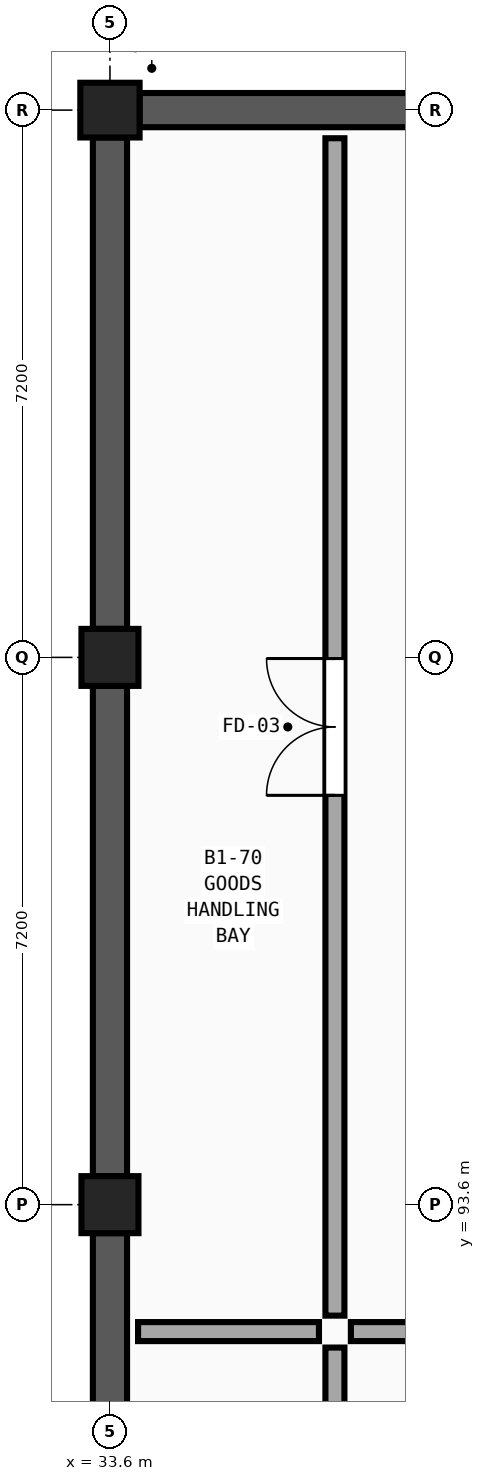
"""IFC4 building model, lengths in metres.
Left out: names, types, materials, properties, quantities, classifications, styles, units other than length and angle.
Written with IfcOpenShell. Run it as: python <this file> out.ifc"""

import sys

from ifc_helpers import new_model, si_unit, direction, frame, frame_2d, origin, origin_2d, place, context, subcontext, project, spatial, rectangle, extrude, element, fill, save


model = new_model("IFC4")
c1 = context("Model", 3, precision=1e-05, world=origin(), true_north=direction((0.0, 1.0)))
c2 = subcontext(c1, "Body", "Model", "MODEL_VIEW")
j1 = project(units=[si_unit("LENGTHUNIT", "METRE"), si_unit("PLANEANGLEUNIT", "RADIAN")], contexts=[c1])
p1 = place(None, origin())
s1 = spatial("IfcSite", under=j1, at=p1, CompositionType="ELEMENT")
p2 = place(p1, origin())
s2 = spatial("IfcBuilding", under=s1, at=p2, CompositionType="ELEMENT")
p3 = place(p2, frame((0.0, 0.0, -5.4)))
s3 = spatial("IfcBuildingStorey", under=s2, at=p3, CompositionType="ELEMENT", Elevation=-5.4)
for number, where, z_axis, x_axis in (
    (1, (33.6, 93.6, 0.0), (0.0, 0.0, 1.0), (1.0, 0.0, 0.0)),
    (2, (33.6, 100.8, 0.0), (0.0, 0.0, 1.0), (1.0, 0.0, 0.0)),
):
    element("IfcColumn", number, at=place(p3, frame(where, z_axis=z_axis, x_axis=x_axis)), inside=s3, PredefinedType="COLUMN", context=c2, shape_type="SweptSolid", body=[
        extrude(rectangle(XDim=0.75, YDim=0.75, at=origin_2d()), origin(), (0.0, 0.0, 1.0), 5.4),
    ])
p4 = place(p3, frame((33.6, 108.0, 0.0), z_axis=(0.0, 0.0, 1.0), x_axis=(1.0, 0.0, 0.0)))
e3 = element("IfcColumn", 3, at=p4, inside=s3, PredefinedType="PILASTER", context=c2, shape_type="SweptSolid", body=[
    extrude(rectangle(XDim=0.78, YDim=0.72, at=origin_2d()), origin(), (0.0, 0.0, 1.0), 5.4),
])
p5 = place(p3, frame((33.6, 86.775, 0.0), z_axis=(0.0, 0.0, 1.0), x_axis=(0.0, 1.0, 0.0)))
e4 = element("IfcWall", 4, at=p5, inside=s3, PredefinedType="USERDEFINED", context=c2, shape_type="SweptSolid", body=[
    extrude(rectangle(XDim=6.45, YDim=0.45, at=frame_2d((3.225, 0.0))), origin(), (0.0, 0.0, 1.0), 4.5),
])
p6 = place(p3, frame((33.6, 93.975, 0.0), z_axis=(0.0, 0.0, 1.0), x_axis=(0.0, 1.0, 0.0)))
e5 = element("IfcWall", 5, at=p6, inside=s3, PredefinedType="USERDEFINED", context=c2, shape_type="SweptSolid", body=[
    extrude(rectangle(XDim=6.45, YDim=0.45, at=frame_2d((3.225, 0.0))), origin(), (0.0, 0.0, 1.0), 4.5),
])
p7 = place(p3, frame((33.99, 108.0, 0.0), z_axis=(0.0, 0.0, 1.0), x_axis=(1.0, 0.0, 0.0)))
e6 = element("IfcWall", 6, at=p7, inside=s3, PredefinedType="USERDEFINED", context=c2, shape_type="SweptSolid", body=[
    extrude(rectangle(XDim=7.62, YDim=0.45, at=frame_2d((3.81, 0.0))), origin(), (0.0, 0.0, 1.0), 4.5),
])
p8 = place(p3, frame((33.6, 101.175, 0.0), z_axis=(0.0, 0.0, 1.0), x_axis=(0.0, 1.0, 0.0)))
e7 = element("IfcWall", 7, at=p8, inside=s3, PredefinedType="USERDEFINED", context=c2, shape_type="SweptSolid", body=[
    extrude(rectangle(XDim=6.465, YDim=0.45, at=frame_2d((3.232, 0.0))), origin(), (0.0, 0.0, 1.0), 4.5),
])
p9 = place(p3, frame((36.77, 91.93, 0.0), z_axis=(0.0, 0.0, 1.0), x_axis=(1.0, 0.0, 0.0)))
e8 = element("IfcWall", 8, at=p9, inside=s3, PredefinedType="SOLIDWALL", context=c2, shape_type="SweptSolid", body=[
    extrude(rectangle(XDim=17.7, YDim=0.25, at=frame_2d((8.85, 0.0))), origin(), (0.0, 0.0, 1.0), 5.05),
])
p10 = place(p9, frame((7.95, 0.0, 0.0)))
e9 = element("IfcOpeningElement", 9, at=p10, cuts=e8, PredefinedType="OPENING", context=c2, shape_type="SweptSolid", body=[
    extrude(rectangle(XDim=1.8, YDim=2.3, at=frame_2d((0.9, 1.15))), frame((0.0, 0.145, 0.0), z_axis=(0.0, -1.0, 0.0), x_axis=(1.0, 0.0, 0.0)), (0.0, 0.0, 1.0), 0.29),
])
p11 = place(p3, frame((36.56, 92.14, 0.0), z_axis=(0.0, 0.0, 1.0), x_axis=(0.0, 1.0, 0.0)))
e10 = element("IfcWall", 10, at=p11, inside=s3, PredefinedType="SOLIDWALL", context=c2, shape_type="SweptSolid", body=[
    extrude(rectangle(XDim=15.49, YDim=0.25, at=frame_2d((7.745, 0.0))), origin(), (0.0, 0.0, 1.0), 5.05),
])
p12 = place(p11, frame((6.845, 0.0, 0.0)))
e11 = element("IfcOpeningElement", 11, at=p12, cuts=e10, PredefinedType="OPENING", context=c2, shape_type="SweptSolid", body=[
    extrude(rectangle(XDim=1.8, YDim=2.3, at=frame_2d((0.9, 1.15))), frame((0.0, 0.145, 0.0), z_axis=(0.0, -1.0, 0.0), x_axis=(1.0, 0.0, 0.0)), (0.0, 0.0, 1.0), 0.29),
])
p13 = place(p3, frame((36.56, 85.078, 0.0), z_axis=(0.0, 0.0, 1.0), x_axis=(0.0, 1.0, 0.0)))
e12 = element("IfcWall", 12, at=p13, inside=s3, PredefinedType="SOLIDWALL", context=c2, shape_type="SweptSolid", body=[
    extrude(rectangle(XDim=6.642, YDim=0.25, at=frame_2d((3.321, 0.0))), origin(), (0.0, 0.0, 1.0), 5.05),
])
p14 = place(p3, frame((33.97, 91.93, 0.0), z_axis=(0.0, 0.0, 1.0), x_axis=(1.0, 0.0, 0.0)))
e13 = element("IfcWall", 13, at=p14, inside=s3, PredefinedType="SOLIDWALL", context=c2, shape_type="SweptSolid", body=[
    extrude(rectangle(XDim=2.38, YDim=0.25, at=frame_2d((1.19, 0.0))), origin(), (0.0, 0.0, 1.0), 5.05),
])
p15 = place(p12, origin())
e14 = element("IfcDoor", 14, at=p15, inside=s3, OperationType="DOUBLE_DOOR_SINGLE_SWING", PredefinedType="DOOR", context=c2, shape_type="SweptSolid", body=[
    extrude(rectangle(XDim=1.8, YDim=2.3, at=frame_2d((0.9, 1.15))), frame((0.0, 0.025, 0.0), z_axis=(0.0, -1.0, 0.0), x_axis=(1.0, 0.0, 0.0)), (0.0, 0.0, 1.0), 0.05),
])
fill(e11, e14)
save(model, sys.argv[1])
